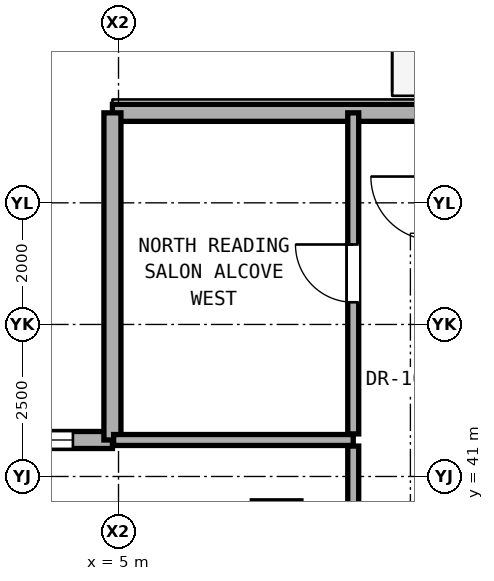
"""IFC4 building model, lengths in metres.
Left out: names, types, materials, properties, quantities, classifications, styles, units other than length and angle.
Written with IfcOpenShell. Run it as: python <this file> out.ifc"""

import sys

from ifc_helpers import new_model, si_unit, direction, frame, frame_2d, origin, place, context, subcontext, project, spatial, rectangle, extrude, element, fill, save


model = new_model("IFC4")
c1 = context("Model", 3, precision=1e-05, world=origin(), true_north=direction((0.0, 1.0)))
c2 = subcontext(c1, "Body", "Model", "MODEL_VIEW")
j1 = project(units=[si_unit("LENGTHUNIT", "METRE"), si_unit("PLANEANGLEUNIT", "RADIAN")], contexts=[c1])
p1 = place(None, origin())
s1 = spatial("IfcSite", under=j1, at=p1, CompositionType="ELEMENT")
p2 = place(p1, origin())
s2 = spatial("IfcBuilding", under=s1, at=p2, CompositionType="ELEMENT")
p3 = place(p2, frame((0.0, 0.0, 22.4)))
s3 = spatial("IfcBuildingStorey", under=s2, at=p3, CompositionType="ELEMENT", Elevation=22.4)
p4 = place(p3, frame((4.9, 46.98, 0.0), z_axis=(0.0, 0.0, 1.0), x_axis=(1.0, 0.0, 0.0)))
e1 = element("IfcWall", 1, at=p4, inside=s3, PredefinedType="SOLIDWALL", context=c2, shape_type="SweptSolid", body=[
    extrude(rectangle(XDim=12.8, YDim=0.28, at=frame_2d((6.4, 0.0))), origin(), (0.0, 0.0, 1.0), 3.04),
])
p5 = place(p4, frame((10.1, 0.0, 0.0)))
e2 = element("IfcOpeningElement", 2, at=p5, cuts=e1, PredefinedType="OPENING", context=c2, shape_type="SweptSolid", body=[
    extrude(rectangle(XDim=1.0, YDim=2.15, at=frame_2d((0.5, 1.075))), frame((0.0, 0.15, 0.0), z_axis=(0.0, -1.0, 0.0), x_axis=(1.0, 0.0, 0.0)), (0.0, 0.0, 1.0), 0.3),
])
p6 = place(p3, frame((4.9, 41.6, 0.0), z_axis=(0.0, 0.0, 1.0), x_axis=(-1.0, 0.0, 0.0)))
e3 = element("IfcWall", 3, at=p6, inside=s3, PredefinedType="SOLIDWALL", context=c2, shape_type="SweptSolid", body=[
    extrude(rectangle(XDim=5.38, YDim=0.28, at=frame_2d((2.69, 0.0))), origin(), (0.0, 0.0, 1.0), 3.04),
])
p7 = place(p6, frame((0.65, 0.0, 0.85)))
e4 = element("IfcOpeningElement", 4, at=p7, cuts=e3, PredefinedType="OPENING", context=c2, shape_type="SweptSolid", body=[
    extrude(rectangle(XDim=1.1, YDim=2.0, at=frame_2d((0.55, 1.0))), frame((0.0, 0.15, 0.0), z_axis=(0.0, -1.0, 0.0), x_axis=(1.0, 0.0, 0.0)), (0.0, 0.0, 1.0), 0.3),
])
p8 = place(p3, frame((4.9, 46.98, 0.0), z_axis=(0.0, 0.0, 1.0), x_axis=(0.0, -1.0, 0.0)))
e5 = element("IfcWall", 5, at=p8, inside=s3, PredefinedType="SOLIDWALL", context=c2, shape_type="SweptSolid", body=[
    extrude(rectangle(XDim=5.38, YDim=0.28, at=frame_2d((2.69, 0.0))), origin(), (0.0, 0.0, 1.0), 3.04),
])
p9 = place(p3, frame((4.92, 41.6, 0.0), z_axis=(0.0, 0.0, 1.0), x_axis=(1.0, 0.0, 0.0)))
e6 = element("IfcWall", 6, at=p9, inside=s3, PredefinedType="PARTITIONING", context=c2, shape_type="SweptSolid", body=[
    extrude(rectangle(XDim=3.94, YDim=0.18, at=frame_2d((1.97, 0.0))), origin(), (0.0, 0.0, 1.0), 3.06),
])
p10 = place(p3, frame((8.86, 32.899, 0.0), z_axis=(0.0, 0.0, 1.0), x_axis=(0.0, 1.0, 0.0)))
e7 = element("IfcWall", 7, at=p10, inside=s3, PredefinedType="PARTITIONING", context=c2, shape_type="SweptSolid", body=[
    extrude(rectangle(XDim=8.601, YDim=0.18, at=frame_2d((4.301, 0.0))), origin(), (0.0, 0.0, 1.0), 2.436),
])
p11 = place(p10, frame((3.775, 0.0, 0.0)))
e8 = element("IfcOpeningElement", 8, at=p11, cuts=e7, PredefinedType="OPENING", context=c2, shape_type="SweptSolid", body=[
    extrude(rectangle(XDim=1.05, YDim=2.2, at=frame_2d((0.525, 1.1))), frame((0.0, 0.1, 0.0), z_axis=(0.0, -1.0, 0.0), x_axis=(1.0, 0.0, 0.0)), (0.0, 0.0, 1.0), 0.2),
])
p12 = place(p3, frame((8.86, 41.7, 0.0), z_axis=(0.0, 0.0, 1.0), x_axis=(0.0, 1.0, 0.0)))
e9 = element("IfcWall", 9, at=p12, inside=s3, PredefinedType="PARTITIONING", context=c2, shape_type="SweptSolid", body=[
    extrude(rectangle(XDim=5.28, YDim=0.18, at=frame_2d((2.64, 0.0))), origin(), (0.0, 0.0, 1.0), 3.06),
])
p13 = place(p12, frame((2.165, 0.0, 0.0)))
e10 = element("IfcOpeningElement", 10, at=p13, cuts=e9, PredefinedType="OPENING", context=c2, shape_type="SweptSolid", body=[
    extrude(rectangle(XDim=0.95, YDim=2.15, at=frame_2d((0.475, 1.075))), frame((0.0, 0.1, 0.0), z_axis=(0.0, -1.0, 0.0), x_axis=(1.0, 0.0, 0.0)), (0.0, 0.0, 1.0), 0.2),
])
p14 = place(p7, origin())
e11 = element("IfcWindow", 11, at=p14, inside=s3, PartitioningType="SINGLE_PANEL", PredefinedType="WINDOW", context=c2, shape_type="SweptSolid", body=[
    extrude(rectangle(XDim=1.1, YDim=2.0, at=frame_2d((0.55, 1.0))), frame((0.0, 0.03, 0.0), z_axis=(0.0, -1.0, 0.0), x_axis=(1.0, 0.0, 0.0)), (0.0, 0.0, 1.0), 0.06),
])
fill(e4, e11)
p15 = place(p13, origin())
e12 = element("IfcDoor", 12, at=p15, inside=s3, OperationType="SINGLE_SWING_RIGHT", PredefinedType="DOOR", context=c2, shape_type="SweptSolid", body=[
    extrude(rectangle(XDim=0.95, YDim=2.15, at=frame_2d((0.475, 1.075))), frame((0.0, 0.025, 0.0), z_axis=(0.0, -1.0, 0.0), x_axis=(1.0, 0.0, 0.0)), (0.0, 0.0, 1.0), 0.05),
])
fill(e10, e12)
save(model, sys.argv[1])
